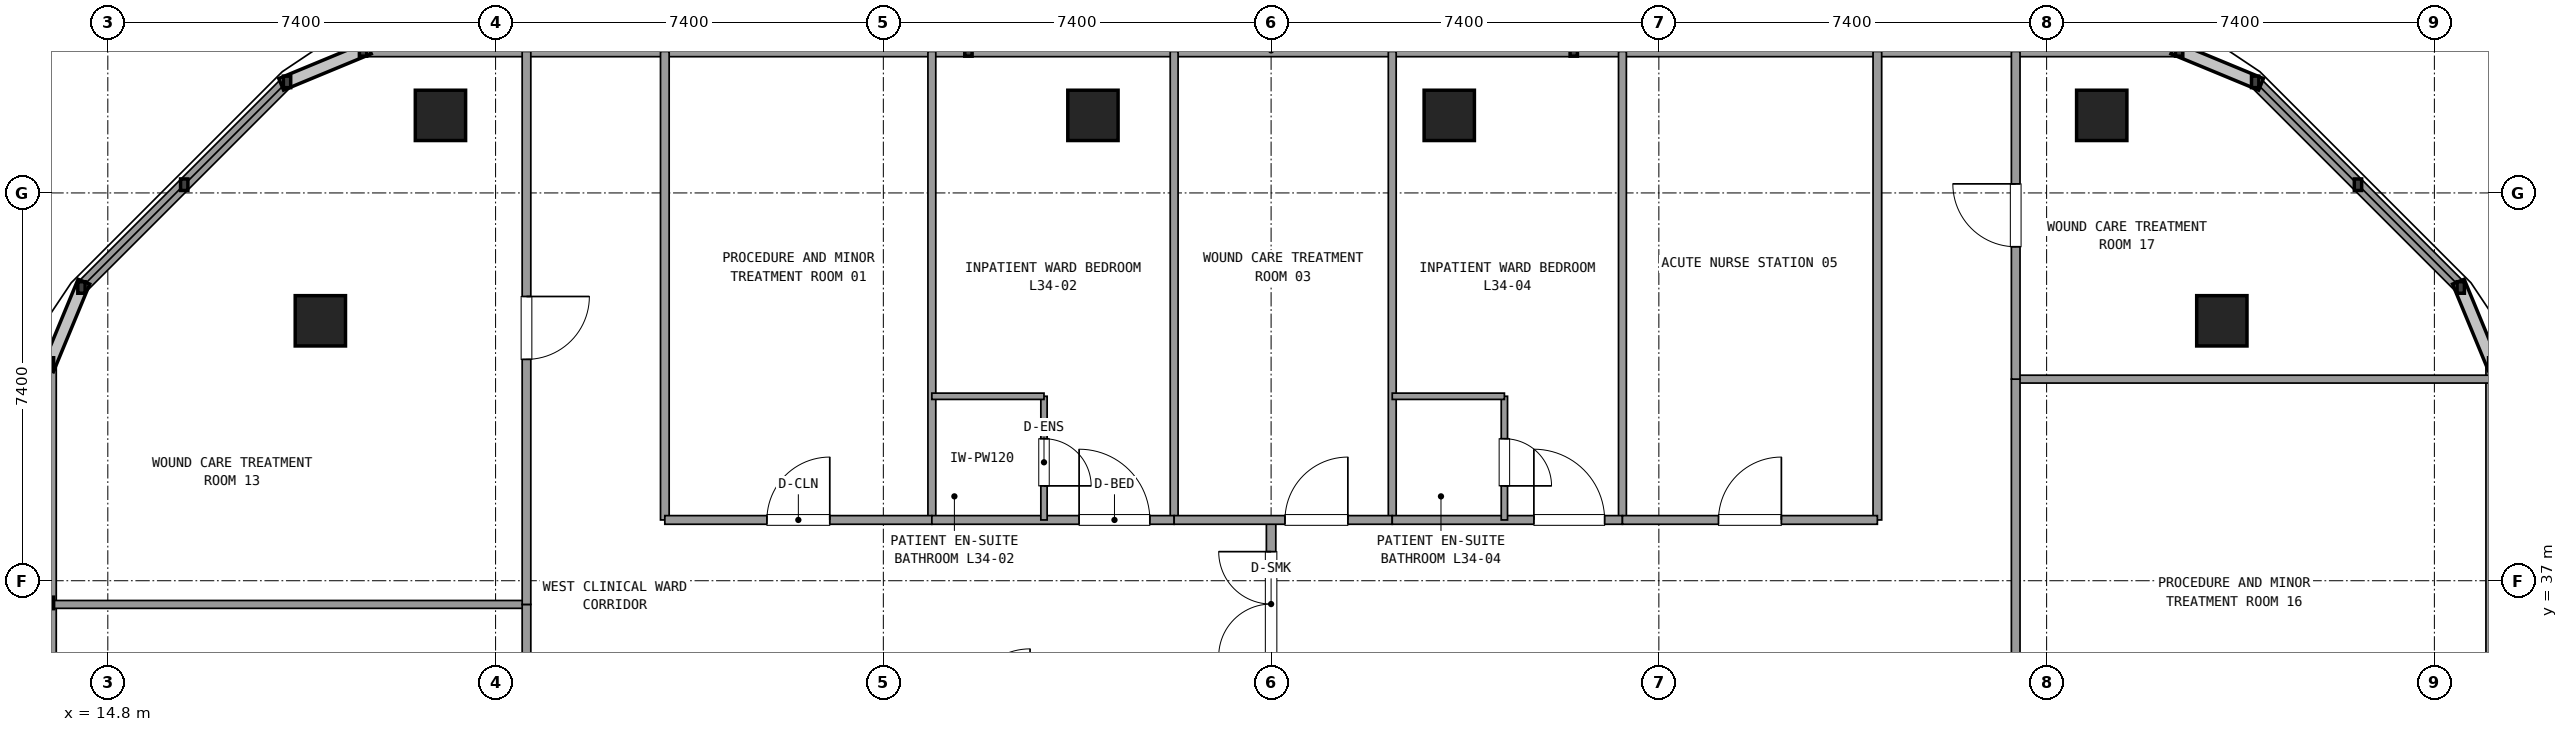
"""IFC4 building model, lengths in metres.
Left out: names, types, materials, properties, quantities, classifications, styles, units other than length and angle.
Written with IfcOpenShell. Run it as: python <this file> out.ifc"""

import sys

from ifc_helpers import new_model, si_unit, direction, frame, frame_2d, origin, origin_2d, place, context, subcontext, project, spatial, rectangle, extrude, element, fill, save


model = new_model("IFC4")
c1 = context("Model", 3, precision=1e-05, world=origin(), true_north=direction((0.0, 1.0)))
c2 = subcontext(c1, "Body", "Model", "MODEL_VIEW")
j1 = project(units=[si_unit("LENGTHUNIT", "METRE"), si_unit("PLANEANGLEUNIT", "RADIAN")], contexts=[c1])
p1 = place(None, origin())
s1 = spatial("IfcSite", under=j1, at=p1, CompositionType="ELEMENT")
p2 = place(p1, origin())
s2 = spatial("IfcBuilding", under=s1, at=p2, CompositionType="ELEMENT")
p3 = place(p2, frame((0.0, 0.0, 134.82)))
s3 = spatial("IfcBuildingStorey", under=s2, at=p3, CompositionType="ELEMENT", Elevation=134.82)
for number, where, z_axis, x_axis in (
    (1, (55.144, 41.96, 0.0), (0.0, 0.0, 1.0), (1.0, 0.0, 0.0)),
    (2, (52.852, 45.88, 0.0), (0.0, 0.0, 1.0), (1.0, 0.0, 0.0)),
    (3, (40.4, 45.88, 0.0), (0.0, 0.0, 1.0), (1.0, 0.0, 0.0)),
    (4, (33.6, 45.88, 0.0), (0.0, 0.0, 1.0), (1.0, 0.0, 0.0)),
    (5, (21.148, 45.88, 0.0), (0.0, 0.0, 1.0), (1.0, 0.0, 0.0)),
    (6, (18.856, 41.96, 0.0), (0.0, 0.0, 1.0), (1.0, 0.0, 0.0)),
):
    element("IfcColumn", number, at=place(p3, frame(where, z_axis=z_axis, x_axis=x_axis)), inside=s3, PredefinedType="COLUMN", context=c2, shape_type="SweptSolid", body=[
        extrude(rectangle(XDim=0.96, YDim=0.96, at=origin_2d()), origin(), (0.0, 0.0, 1.0), 3.6),
    ])
p4 = place(p3, frame((60.304, 10.655, 0.0), z_axis=(0.0, 0.0, 1.0), x_axis=(0.0, 1.0, 0.0)))
e7 = element("IfcWall", 7, at=p4, inside=s3, PredefinedType="SOLIDWALL", context=c2, shape_type="SweptSolid", body=[
    extrude(rectangle(XDim=30.49, YDim=0.24, at=frame_2d((15.245, 0.0))), origin(), (0.0, 0.0, 1.0), 0.85),
])
p5 = place(p3, frame((59.703, 42.596, 0.0), z_axis=(0.0, 0.0, 1.0), x_axis=(-0.707084777957, 0.707128783731, 0.0)))
e8 = element("IfcWall", 8, at=p5, inside=s3, PredefinedType="SOLIDWALL", context=c2, shape_type="SweptSolid", body=[
    extrude(rectangle(XDim=5.548, YDim=0.24, at=frame_2d((2.774, 0.0))), origin(), (0.0, 0.0, 1.0), 0.85),
])
p6 = place(p3, frame((54.329, 47.12, 0.0), z_axis=(0.0, 0.0, 1.0), x_axis=(-1.0, 0.0, 0.0)))
e9 = element("IfcWall", 9, at=p6, inside=s3, PredefinedType="SOLIDWALL", context=c2, shape_type="SweptSolid", body=[
    extrude(rectangle(XDim=34.658, YDim=0.24, at=frame_2d((17.329, 0.0))), origin(), (0.0, 0.0, 1.0), 0.85),
])
p7 = place(p3, frame((18.22, 46.519, 0.0), z_axis=(0.0, 0.0, 1.0), x_axis=(-0.707084777957, -0.707128783731, 0.0)))
e10 = element("IfcWall", 10, at=p7, inside=s3, PredefinedType="SOLIDWALL", context=c2, shape_type="SweptSolid", body=[
    extrude(rectangle(XDim=5.548, YDim=0.24, at=frame_2d((2.774, 0.0))), origin(), (0.0, 0.0, 1.0), 0.85),
])
p8 = place(p3, frame((13.696, 41.145, 0.0), z_axis=(0.0, 0.0, 1.0), x_axis=(0.0, -1.0, 0.0)))
e11 = element("IfcWall", 11, at=p8, inside=s3, PredefinedType="SOLIDWALL", context=c2, shape_type="SweptSolid", body=[
    extrude(rectangle(XDim=13.705, YDim=0.24, at=frame_2d((6.853, 0.0))), origin(), (0.0, 0.0, 1.0), 0.85),
])
p9 = place(p3, frame((37.0, 34.95, 0.0), z_axis=(0.0, 0.0, 1.0), x_axis=(0.0, 1.0, 0.0)))
e12 = element("IfcWall", 12, at=p9, inside=s3, PredefinedType="PARTITIONING", context=c2, shape_type="SweptSolid", body=[
    extrude(rectangle(XDim=3.21, YDim=0.18, at=frame_2d((1.605, 0.0))), origin(), (0.0, 0.0, 1.0), 2.61),
])
p10 = place(p9, frame((0.605, 0.0, 0.0)))
e13 = element("IfcOpeningElement", 13, at=p10, cuts=e12, PredefinedType="OPENING", context=c2, shape_type="SweptSolid", body=[
    extrude(rectangle(XDim=2.0, YDim=2.2, at=frame_2d((1.0, 1.1))), frame((0.0, 0.1, 0.0), z_axis=(0.0, -1.0, 0.0), x_axis=(1.0, 0.0, 0.0)), (0.0, 0.0, 1.0), 0.2),
])
for number, where, z_axis, x_axis in (
    (14, (25.43, 38.16, 0.0), (0.0, 0.0, 1.0), (0.0, 1.0, 0.0)),
    (15, (48.57, 38.16, 0.0), (0.0, 0.0, 1.0), (0.0, 1.0, 0.0)),
):
    element("IfcWall", number, at=place(p3, frame(where, z_axis=z_axis, x_axis=x_axis)), inside=s3, PredefinedType="PARTITIONING", context=c2, shape_type="SweptSolid", body=[
        extrude(rectangle(XDim=8.94, YDim=0.165, at=frame_2d((4.47, 0.0))), origin(), (0.0, 0.0, 1.0), 2.61),
    ])
p11 = place(p3, frame((30.526, 38.16, 0.0), z_axis=(0.0, 0.0, 1.0), x_axis=(0.0, 1.0, 0.0)))
e16 = element("IfcWall", 16, at=p11, inside=s3, PredefinedType="PARTITIONING", context=c2, shape_type="SweptSolid", body=[
    extrude(rectangle(XDim=8.94, YDim=0.15, at=frame_2d((4.47, 0.0))), origin(), (0.0, 0.0, 1.0), 2.61),
])
p12 = place(p3, frame((25.43, 38.16, 0.0), z_axis=(0.0, 0.0, 1.0), x_axis=(1.0, 0.0, 0.0)))
e17 = element("IfcWall", 17, at=p12, inside=s3, PredefinedType="PARTITIONING", context=c2, shape_type="SweptSolid", body=[
    extrude(rectangle(XDim=5.096, YDim=0.165, at=frame_2d((2.548, 0.0))), origin(), (0.0, 0.0, 1.0), 2.61),
])
p13 = place(p12, frame((1.948, 0.0, 0.0)))
e18 = element("IfcOpeningElement", 18, at=p13, cuts=e17, PredefinedType="OPENING", context=c2, shape_type="SweptSolid", body=[
    extrude(rectangle(XDim=1.2, YDim=2.15, at=frame_2d((0.6, 1.075))), frame((0.0, 0.093, 0.0), z_axis=(0.0, -1.0, 0.0), x_axis=(1.0, 0.0, 0.0)), (0.0, 0.0, 1.0), 0.185),
])
p14 = place(p3, frame((35.15, 38.16, 0.0), z_axis=(0.0, 0.0, 1.0), x_axis=(0.0, 1.0, 0.0)))
e19 = element("IfcWall", 19, at=p14, inside=s3, PredefinedType="PARTITIONING", context=c2, shape_type="SweptSolid", body=[
    extrude(rectangle(XDim=8.94, YDim=0.15, at=frame_2d((4.47, 0.0))), origin(), (0.0, 0.0, 1.0), 2.61),
])
p15 = place(p3, frame((30.526, 38.16, 0.0), z_axis=(0.0, 0.0, 1.0), x_axis=(1.0, 0.0, 0.0)))
e20 = element("IfcWall", 20, at=p15, inside=s3, PredefinedType="PARTITIONING", context=c2, shape_type="SweptSolid", body=[
    extrude(rectangle(XDim=4.624, YDim=0.165, at=frame_2d((2.312, 0.0))), origin(), (0.0, 0.0, 1.0), 2.61),
])
p16 = place(p15, frame((2.81, 0.0, 0.0)))
e21 = element("IfcOpeningElement", 21, at=p16, cuts=e20, PredefinedType="OPENING", context=c2, shape_type="SweptSolid", body=[
    extrude(rectangle(XDim=1.35, YDim=2.15, at=frame_2d((0.675, 1.075))), frame((0.0, 0.093, 0.0), z_axis=(0.0, -1.0, 0.0), x_axis=(1.0, 0.0, 0.0)), (0.0, 0.0, 1.0), 0.185),
])
p17 = place(p3, frame((32.666, 38.16, 0.0), z_axis=(0.0, 0.0, 1.0), x_axis=(0.0, 1.0, 0.0)))
e22 = element("IfcWall", 22, at=p17, inside=s3, PredefinedType="PLUMBINGWALL", context=c2, shape_type="SweptSolid", body=[
    extrude(rectangle(XDim=2.36, YDim=0.12, at=frame_2d((1.18, 0.0))), origin(), (0.0, 0.0, 1.0), 2.61),
])
p18 = place(p17, frame((0.65, 0.0, 0.0)))
e23 = element("IfcOpeningElement", 23, at=p18, cuts=e22, PredefinedType="OPENING", context=c2, shape_type="SweptSolid", body=[
    extrude(rectangle(XDim=0.9, YDim=2.1, at=frame_2d((0.45, 1.05))), frame((0.0, 0.07, 0.0), z_axis=(0.0, -1.0, 0.0), x_axis=(1.0, 0.0, 0.0)), (0.0, 0.0, 1.0), 0.14),
])
p19 = place(p3, frame((30.526, 40.52, 0.0), z_axis=(0.0, 0.0, 1.0), x_axis=(1.0, 0.0, 0.0)))
e24 = element("IfcWall", 24, at=p19, inside=s3, PredefinedType="PLUMBINGWALL", context=c2, shape_type="SweptSolid", body=[
    extrude(rectangle(XDim=2.14, YDim=0.12, at=frame_2d((1.07, 0.0))), origin(), (0.0, 0.0, 1.0), 2.61),
])
p20 = place(p3, frame((39.312, 38.16, 0.0), z_axis=(0.0, 0.0, 1.0), x_axis=(0.0, 1.0, 0.0)))
e25 = element("IfcWall", 25, at=p20, inside=s3, PredefinedType="PARTITIONING", context=c2, shape_type="SweptSolid", body=[
    extrude(rectangle(XDim=8.94, YDim=0.15, at=frame_2d((4.47, 0.0))), origin(), (0.0, 0.0, 1.0), 2.61),
])
p21 = place(p3, frame((35.15, 38.16, 0.0), z_axis=(0.0, 0.0, 1.0), x_axis=(1.0, 0.0, 0.0)))
e26 = element("IfcWall", 26, at=p21, inside=s3, PredefinedType="PARTITIONING", context=c2, shape_type="SweptSolid", body=[
    extrude(rectangle(XDim=4.162, YDim=0.165, at=frame_2d((2.081, 0.0))), origin(), (0.0, 0.0, 1.0), 2.61),
])
p22 = place(p21, frame((2.115, 0.0, 0.0)))
e27 = element("IfcOpeningElement", 27, at=p22, cuts=e26, PredefinedType="OPENING", context=c2, shape_type="SweptSolid", body=[
    extrude(rectangle(XDim=1.2, YDim=2.15, at=frame_2d((0.6, 1.075))), frame((0.0, 0.093, 0.0), z_axis=(0.0, -1.0, 0.0), x_axis=(1.0, 0.0, 0.0)), (0.0, 0.0, 1.0), 0.185),
])
p23 = place(p3, frame((43.705, 38.16, 0.0), z_axis=(0.0, 0.0, 1.0), x_axis=(0.0, 1.0, 0.0)))
e28 = element("IfcWall", 28, at=p23, inside=s3, PredefinedType="PARTITIONING", context=c2, shape_type="SweptSolid", body=[
    extrude(rectangle(XDim=8.94, YDim=0.15, at=frame_2d((4.47, 0.0))), origin(), (0.0, 0.0, 1.0), 2.61),
])
p24 = place(p3, frame((39.312, 38.16, 0.0), z_axis=(0.0, 0.0, 1.0), x_axis=(1.0, 0.0, 0.0)))
e29 = element("IfcWall", 29, at=p24, inside=s3, PredefinedType="PARTITIONING", context=c2, shape_type="SweptSolid", body=[
    extrude(rectangle(XDim=4.393, YDim=0.165, at=frame_2d((2.197, 0.0))), origin(), (0.0, 0.0, 1.0), 2.61),
])
p25 = place(p24, frame((2.703, 0.0, 0.0)))
e30 = element("IfcOpeningElement", 30, at=p25, cuts=e29, PredefinedType="OPENING", context=c2, shape_type="SweptSolid", body=[
    extrude(rectangle(XDim=1.35, YDim=2.15, at=frame_2d((0.675, 1.075))), frame((0.0, 0.093, 0.0), z_axis=(0.0, -1.0, 0.0), x_axis=(1.0, 0.0, 0.0)), (0.0, 0.0, 1.0), 0.185),
])
p26 = place(p3, frame((41.452, 38.16, 0.0), z_axis=(0.0, 0.0, 1.0), x_axis=(0.0, 1.0, 0.0)))
e31 = element("IfcWall", 31, at=p26, inside=s3, PredefinedType="PLUMBINGWALL", context=c2, shape_type="SweptSolid", body=[
    extrude(rectangle(XDim=2.36, YDim=0.12, at=frame_2d((1.18, 0.0))), origin(), (0.0, 0.0, 1.0), 2.61),
])
p27 = place(p26, frame((0.65, 0.0, 0.0)))
e32 = element("IfcOpeningElement", 32, at=p27, cuts=e31, PredefinedType="OPENING", context=c2, shape_type="SweptSolid", body=[
    extrude(rectangle(XDim=0.9, YDim=2.1, at=frame_2d((0.45, 1.05))), frame((0.0, 0.07, 0.0), z_axis=(0.0, -1.0, 0.0), x_axis=(1.0, 0.0, 0.0)), (0.0, 0.0, 1.0), 0.14),
])
p28 = place(p3, frame((39.312, 40.52, 0.0), z_axis=(0.0, 0.0, 1.0), x_axis=(1.0, 0.0, 0.0)))
e33 = element("IfcWall", 33, at=p28, inside=s3, PredefinedType="PLUMBINGWALL", context=c2, shape_type="SweptSolid", body=[
    extrude(rectangle(XDim=2.14, YDim=0.12, at=frame_2d((1.07, 0.0))), origin(), (0.0, 0.0, 1.0), 2.61),
])
p29 = place(p3, frame((43.705, 38.16, 0.0), z_axis=(0.0, 0.0, 1.0), x_axis=(1.0, 0.0, 0.0)))
e34 = element("IfcWall", 34, at=p29, inside=s3, PredefinedType="PARTITIONING", context=c2, shape_type="SweptSolid", body=[
    extrude(rectangle(XDim=4.865, YDim=0.165, at=frame_2d((2.433, 0.0))), origin(), (0.0, 0.0, 1.0), 2.61),
])
p30 = place(p29, frame((1.833, 0.0, 0.0)))
e35 = element("IfcOpeningElement", 35, at=p30, cuts=e34, PredefinedType="OPENING", context=c2, shape_type="SweptSolid", body=[
    extrude(rectangle(XDim=1.2, YDim=2.15, at=frame_2d((0.6, 1.075))), frame((0.0, 0.093, 0.0), z_axis=(0.0, -1.0, 0.0), x_axis=(1.0, 0.0, 0.0)), (0.0, 0.0, 1.0), 0.185),
])
p31 = place(p3, frame((22.79, 36.548, 0.0), z_axis=(0.0, 0.0, 1.0), x_axis=(-1.0, 0.0, 0.0)))
e36 = element("IfcWall", 36, at=p31, inside=s3, PredefinedType="PARTITIONING", context=c2, shape_type="SweptSolid", body=[
    extrude(rectangle(XDim=9.074, YDim=0.15, at=frame_2d((4.537, 0.0))), origin(), (0.0, 0.0, 1.0), 2.61),
])
p32 = place(p3, frame((22.79, 27.56, 0.0), z_axis=(0.0, 0.0, 1.0), x_axis=(0.0, 1.0, 0.0)))
e37 = element("IfcWall", 37, at=p32, inside=s3, PredefinedType="PARTITIONING", context=c2, shape_type="SweptSolid", body=[
    extrude(rectangle(XDim=8.988, YDim=0.165, at=frame_2d((4.494, 0.0))), origin(), (0.0, 0.0, 1.0), 2.61),
])
p33 = place(p32, frame((3.894, 0.0, 0.0)))
e38 = element("IfcOpeningElement", 38, at=p33, cuts=e37, PredefinedType="OPENING", context=c2, shape_type="SweptSolid", body=[
    extrude(rectangle(XDim=1.2, YDim=2.15, at=frame_2d((0.6, 1.075))), frame((0.0, 0.093, 0.0), z_axis=(0.0, -1.0, 0.0), x_axis=(1.0, 0.0, 0.0)), (0.0, 0.0, 1.0), 0.185),
])
p34 = place(p3, frame((22.79, 36.548, 0.0), z_axis=(0.0, 0.0, 1.0), x_axis=(0.0, 1.0, 0.0)))
e39 = element("IfcWall", 39, at=p34, inside=s3, PredefinedType="PARTITIONING", context=c2, shape_type="SweptSolid", body=[
    extrude(rectangle(XDim=10.552, YDim=0.165, at=frame_2d((5.276, 0.0))), origin(), (0.0, 0.0, 1.0), 2.61),
])
p35 = place(p34, frame((4.676, 0.0, 0.0)))
e40 = element("IfcOpeningElement", 40, at=p35, cuts=e39, PredefinedType="OPENING", context=c2, shape_type="SweptSolid", body=[
    extrude(rectangle(XDim=1.2, YDim=2.15, at=frame_2d((0.6, 1.075))), frame((0.0, 0.093, 0.0), z_axis=(0.0, -1.0, 0.0), x_axis=(1.0, 0.0, 0.0)), (0.0, 0.0, 1.0), 0.185),
])
p36 = place(p3, frame((51.21, 40.847, 0.0), z_axis=(0.0, 0.0, 1.0), x_axis=(1.0, 0.0, 0.0)))
e41 = element("IfcWall", 41, at=p36, inside=s3, PredefinedType="PARTITIONING", context=c2, shape_type="SweptSolid", body=[
    extrude(rectangle(XDim=9.074, YDim=0.15, at=frame_2d((4.537, 0.0))), origin(), (0.0, 0.0, 1.0), 2.61),
])
p37 = place(p3, frame((51.21, 27.56, 0.0), z_axis=(0.0, 0.0, 1.0), x_axis=(0.0, 1.0, 0.0)))
e42 = element("IfcWall", 42, at=p37, inside=s3, PredefinedType="PARTITIONING", context=c2, shape_type="SweptSolid", body=[
    extrude(rectangle(XDim=13.287, YDim=0.165, at=frame_2d((6.644, 0.0))), origin(), (0.0, 0.0, 1.0), 2.61),
])
p38 = place(p37, frame((6.044, 0.0, 0.0)))
e43 = element("IfcOpeningElement", 43, at=p38, cuts=e42, PredefinedType="OPENING", context=c2, shape_type="SweptSolid", body=[
    extrude(rectangle(XDim=1.2, YDim=2.15, at=frame_2d((0.6, 1.075))), frame((0.0, 0.093, 0.0), z_axis=(0.0, -1.0, 0.0), x_axis=(1.0, 0.0, 0.0)), (0.0, 0.0, 1.0), 0.185),
])
p39 = place(p3, frame((51.21, 40.847, 0.0), z_axis=(0.0, 0.0, 1.0), x_axis=(0.0, 1.0, 0.0)))
e44 = element("IfcWall", 44, at=p39, inside=s3, PredefinedType="PARTITIONING", context=c2, shape_type="SweptSolid", body=[
    extrude(rectangle(XDim=6.253, YDim=0.165, at=frame_2d((3.126, 0.0))), origin(), (0.0, 0.0, 1.0), 2.61),
])
p40 = place(p39, frame((2.526, 0.0, 0.0)))
e45 = element("IfcOpeningElement", 45, at=p40, cuts=e44, PredefinedType="OPENING", context=c2, shape_type="SweptSolid", body=[
    extrude(rectangle(XDim=1.2, YDim=2.15, at=frame_2d((0.6, 1.075))), frame((0.0, 0.093, 0.0), z_axis=(0.0, -1.0, 0.0), x_axis=(1.0, 0.0, 0.0)), (0.0, 0.0, 1.0), 0.185),
])
p41 = place(p10, origin())
e46 = element("IfcDoor", 46, at=p41, inside=s3, OperationType="DOUBLE_DOOR_SINGLE_SWING", PredefinedType="DOOR", context=c2, shape_type="SweptSolid", body=[
    extrude(rectangle(XDim=2.0, YDim=2.2, at=frame_2d((1.0, 1.1))), frame((0.0, 0.025, 0.0), z_axis=(0.0, -1.0, 0.0), x_axis=(1.0, 0.0, 0.0)), (0.0, 0.0, 1.0), 0.05),
])
fill(e13, e46)
p42 = place(p13, origin())
e47 = element("IfcDoor", 47, at=p42, inside=s3, OperationType="SINGLE_SWING_RIGHT", PredefinedType="DOOR", context=c2, shape_type="SweptSolid", body=[
    extrude(rectangle(XDim=1.2, YDim=2.15, at=frame_2d((0.6, 1.075))), frame((0.0, 0.025, 0.0), z_axis=(0.0, -1.0, 0.0), x_axis=(1.0, 0.0, 0.0)), (0.0, 0.0, 1.0), 0.05),
])
fill(e18, e47)
p43 = place(p18, frame((0.9, 0.0, 0.0), z_axis=(0.0, 0.0, 1.0), x_axis=(-1.0, 0.0, 0.0)))
e48 = element("IfcDoor", 48, at=p43, inside=s3, OperationType="SINGLE_SWING_LEFT", PredefinedType="DOOR", context=c2, shape_type="SweptSolid", body=[
    extrude(rectangle(XDim=0.9, YDim=2.1, at=frame_2d((0.45, 1.05))), frame((0.0, 0.025, 0.0), z_axis=(0.0, -1.0, 0.0), x_axis=(1.0, 0.0, 0.0)), (0.0, 0.0, 1.0), 0.05),
])
fill(e23, e48)
p44 = place(p16, origin())
e49 = element("IfcDoor", 49, at=p44, inside=s3, OperationType="SINGLE_SWING_LEFT", PredefinedType="DOOR", context=c2, shape_type="SweptSolid", body=[
    extrude(rectangle(XDim=1.35, YDim=2.15, at=frame_2d((0.675, 1.075))), frame((0.0, 0.025, 0.0), z_axis=(0.0, -1.0, 0.0), x_axis=(1.0, 0.0, 0.0)), (0.0, 0.0, 1.0), 0.05),
])
fill(e21, e49)
p45 = place(p22, origin())
e50 = element("IfcDoor", 50, at=p45, inside=s3, OperationType="SINGLE_SWING_RIGHT", PredefinedType="DOOR", context=c2, shape_type="SweptSolid", body=[
    extrude(rectangle(XDim=1.2, YDim=2.15, at=frame_2d((0.6, 1.075))), frame((0.0, 0.025, 0.0), z_axis=(0.0, -1.0, 0.0), x_axis=(1.0, 0.0, 0.0)), (0.0, 0.0, 1.0), 0.05),
])
fill(e27, e50)
p46 = place(p27, frame((0.9, 0.0, 0.0), z_axis=(0.0, 0.0, 1.0), x_axis=(-1.0, 0.0, 0.0)))
e51 = element("IfcDoor", 51, at=p46, inside=s3, OperationType="SINGLE_SWING_LEFT", PredefinedType="DOOR", context=c2, shape_type="SweptSolid", body=[
    extrude(rectangle(XDim=0.9, YDim=2.1, at=frame_2d((0.45, 1.05))), frame((0.0, 0.025, 0.0), z_axis=(0.0, -1.0, 0.0), x_axis=(1.0, 0.0, 0.0)), (0.0, 0.0, 1.0), 0.05),
])
fill(e32, e51)
p47 = place(p25, origin())
e52 = element("IfcDoor", 52, at=p47, inside=s3, OperationType="SINGLE_SWING_LEFT", PredefinedType="DOOR", context=c2, shape_type="SweptSolid", body=[
    extrude(rectangle(XDim=1.35, YDim=2.15, at=frame_2d((0.675, 1.075))), frame((0.0, 0.025, 0.0), z_axis=(0.0, -1.0, 0.0), x_axis=(1.0, 0.0, 0.0)), (0.0, 0.0, 1.0), 0.05),
])
fill(e30, e52)
p48 = place(p30, origin())
e53 = element("IfcDoor", 53, at=p48, inside=s3, OperationType="SINGLE_SWING_RIGHT", PredefinedType="DOOR", context=c2, shape_type="SweptSolid", body=[
    extrude(rectangle(XDim=1.2, YDim=2.15, at=frame_2d((0.6, 1.075))), frame((0.0, 0.025, 0.0), z_axis=(0.0, -1.0, 0.0), x_axis=(1.0, 0.0, 0.0)), (0.0, 0.0, 1.0), 0.05),
])
fill(e35, e53)
p49 = place(p35, frame((1.2, 0.0, 0.0), z_axis=(0.0, 0.0, 1.0), x_axis=(-1.0, 0.0, 0.0)))
e54 = element("IfcDoor", 54, at=p49, inside=s3, OperationType="SINGLE_SWING_RIGHT", PredefinedType="DOOR", context=c2, shape_type="SweptSolid", body=[
    extrude(rectangle(XDim=1.2, YDim=2.15, at=frame_2d((0.6, 1.075))), frame((0.0, 0.025, 0.0), z_axis=(0.0, -1.0, 0.0), x_axis=(1.0, 0.0, 0.0)), (0.0, 0.0, 1.0), 0.05),
])
fill(e40, e54)
p50 = place(p40, origin())
e55 = element("IfcDoor", 55, at=p50, inside=s3, OperationType="SINGLE_SWING_RIGHT", PredefinedType="DOOR", context=c2, shape_type="SweptSolid", body=[
    extrude(rectangle(XDim=1.2, YDim=2.15, at=frame_2d((0.6, 1.075))), frame((0.0, 0.025, 0.0), z_axis=(0.0, -1.0, 0.0), x_axis=(1.0, 0.0, 0.0)), (0.0, 0.0, 1.0), 0.05),
])
fill(e45, e55)
save(model, sys.argv[1])
